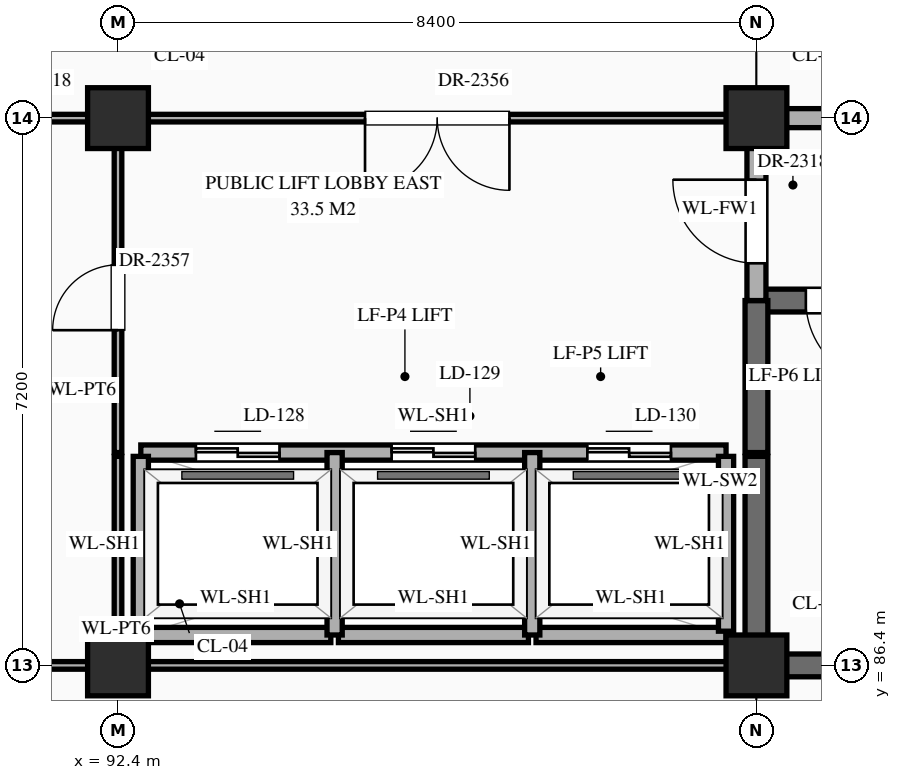
"""IFC4 building model, lengths in metres.
Left out: names, types, materials, properties, quantities, classifications, styles, units other than length and angle.
Written with IfcOpenShell. Run it as: python <this file> out.ifc"""

import sys

from ifc_helpers import new_model, si_unit, direction, frame, frame_2d, origin, origin_2d, place, context, subcontext, project, spatial, rectangle, extrude, element, fill, save


model = new_model("IFC4")
c1 = context("Model", 3, precision=1e-05, world=origin(), true_north=direction((0.0, 1.0)))
c2 = subcontext(c1, "Body", "Model", "MODEL_VIEW")
j1 = project(units=[si_unit("LENGTHUNIT", "METRE"), si_unit("PLANEANGLEUNIT", "RADIAN")], contexts=[c1])
p1 = place(None, origin())
s1 = spatial("IfcSite", under=j1, at=p1, CompositionType="ELEMENT")
p2 = place(p1, origin())
s2 = spatial("IfcBuilding", under=s1, at=p2, CompositionType="ELEMENT")
p3 = place(p2, frame((0.0, 0.0, 30.6)))
s3 = spatial("IfcBuildingStorey", under=s2, at=p3, CompositionType="ELEMENT", Elevation=30.6)
for number, where, z_axis, x_axis in (
    (1, (92.4, 86.4, 0.0), (0.0, 0.0, 1.0), (1.0, 0.0, 0.0)),
    (2, (92.4, 93.6, 0.0), (0.0, 0.0, 1.0), (1.0, 0.0, 0.0)),
    (3, (100.8, 86.4, 0.0), (0.0, 0.0, 1.0), (1.0, 0.0, 0.0)),
    (4, (100.8, 93.6, 0.0), (0.0, 0.0, 1.0), (1.0, 0.0, 0.0)),
):
    element("IfcColumn", number, at=place(p3, frame(where, z_axis=z_axis, x_axis=x_axis)), inside=s3, PredefinedType="COLUMN", context=c2, shape_type="SweptSolid", body=[
        extrude(rectangle(XDim=0.8, YDim=0.8, at=origin_2d()), origin(), (0.0, 0.0, 1.0), 4.5),
    ])
p4 = place(p3, frame((84.0, 86.4, 0.0), z_axis=(0.0, 0.0, 1.0), x_axis=(1.0, 0.0, 0.0)))
e5 = element("IfcWall", 5, at=p4, inside=s3, PredefinedType="STANDARD", context=c2, shape_type="SweptSolid", body=[
    extrude(rectangle(XDim=8.4, YDim=0.1, at=frame_2d((4.2, 0.0))), origin(), (0.0, 0.0, 1.0), 3.39),
])
p5 = place(p4, frame((1.09, 0.0, 0.0)))
e6 = element("IfcOpeningElement", 6, at=p5, cuts=e5, PredefinedType="OPENING", context=c2, shape_type="SweptSolid", body=[
    extrude(rectangle(XDim=0.94, YDim=2.3, at=frame_2d((0.47, 1.15))), frame((0.0, 0.062, 0.0), z_axis=(0.0, -1.0, 0.0), x_axis=(1.0, 0.0, 0.0)), (0.0, 0.0, 1.0), 0.124),
])
p6 = place(p4, frame((3.69, 0.0, 0.0)))
e7 = element("IfcOpeningElement", 7, at=p6, cuts=e5, PredefinedType="OPENING", context=c2, shape_type="SweptSolid", body=[
    extrude(rectangle(XDim=1.02, YDim=2.4, at=frame_2d((0.51, 1.2))), frame((0.0, 0.062, 0.0), z_axis=(0.0, -1.0, 0.0), x_axis=(1.0, 0.0, 0.0)), (0.0, 0.0, 1.0), 0.124),
])
p7 = place(p4, frame((6.31, 0.0, 0.0)))
e8 = element("IfcOpeningElement", 8, at=p7, cuts=e5, PredefinedType="OPENING", context=c2, shape_type="SweptSolid", body=[
    extrude(rectangle(XDim=1.06, YDim=2.4, at=frame_2d((0.53, 1.2))), frame((0.0, 0.062, 0.0), z_axis=(0.0, -1.0, 0.0), x_axis=(1.0, 0.0, 0.0)), (0.0, 0.0, 1.0), 0.124),
])
p8 = place(p3, frame((92.45, 86.4, 0.0), z_axis=(0.0, 0.0, 1.0), x_axis=(1.0, 0.0, 0.0)))
e9 = element("IfcWall", 9, at=p8, inside=s3, PredefinedType="STANDARD", context=c2, shape_type="SweptSolid", body=[
    extrude(rectangle(XDim=8.3, YDim=0.1, at=frame_2d((4.15, 0.0))), origin(), (0.0, 0.0, 1.0), 3.39),
])
p9 = place(p3, frame((100.8, 86.4, 0.0), z_axis=(0.0, 0.0, 1.0), x_axis=(1.0, 0.0, 0.0)))
e10 = element("IfcWall", 10, at=p9, inside=s3, PredefinedType="SHEAR", context=c2, shape_type="SweptSolid", body=[
    extrude(rectangle(XDim=8.4, YDim=0.3, at=frame_2d((4.2, 0.0))), origin(), (0.0, 0.0, 1.0), 4.24),
])
for number, where, z_axis, x_axis in (
    (11, (92.7, 86.8, 0.0), (0.0, 0.0, 1.0), (1.0, 0.0, 0.0)),
    (12, (95.3, 86.8, 0.0), (0.0, 0.0, 1.0), (1.0, 0.0, 0.0)),
    (13, (97.9, 86.8, 0.0), (0.0, 0.0, 1.0), (1.0, 0.0, 0.0)),
):
    element("IfcWall", number, at=place(p3, frame(where, z_axis=z_axis, x_axis=x_axis)), inside=s3, PredefinedType="STANDARD", context=c2, shape_type="SweptSolid", body=[
        extrude(rectangle(XDim=2.5, YDim=0.2, at=frame_2d((1.25, 0.0))), origin(), (0.0, 0.0, 1.0), 4.24),
    ])
p10 = place(p3, frame((92.7, 89.2, 0.0), z_axis=(0.0, 0.0, 1.0), x_axis=(1.0, 0.0, 0.0)))
e14 = element("IfcWall", 14, at=p10, inside=s3, PredefinedType="STANDARD", context=c2, shape_type="SweptSolid", body=[
    extrude(rectangle(XDim=7.7, YDim=0.2, at=frame_2d((3.85, 0.0))), origin(), (0.0, 0.0, 1.0), 4.24),
])
p11 = place(p10, frame((0.725, 0.0, 0.0)))
e15 = element("IfcOpeningElement", 15, at=p11, cuts=e14, PredefinedType="OPENING", context=c2, shape_type="SweptSolid", body=[
    extrude(rectangle(XDim=1.1, YDim=2.15, at=frame_2d((0.55, 1.075))), frame((0.0, 0.112, 0.0), z_axis=(0.0, -1.0, 0.0), x_axis=(1.0, 0.0, 0.0)), (0.0, 0.0, 1.0), 0.224),
])
p12 = place(p10, frame((3.3, 0.0, 0.0)))
e16 = element("IfcOpeningElement", 16, at=p12, cuts=e14, PredefinedType="OPENING", context=c2, shape_type="SweptSolid", body=[
    extrude(rectangle(XDim=1.1, YDim=2.15, at=frame_2d((0.55, 1.075))), frame((0.0, 0.112, 0.0), z_axis=(0.0, -1.0, 0.0), x_axis=(1.0, 0.0, 0.0)), (0.0, 0.0, 1.0), 0.224),
])
p13 = place(p10, frame((5.875, 0.0, 0.0)))
e17 = element("IfcOpeningElement", 17, at=p13, cuts=e14, PredefinedType="OPENING", context=c2, shape_type="SweptSolid", body=[
    extrude(rectangle(XDim=1.1, YDim=2.15, at=frame_2d((0.55, 1.075))), frame((0.0, 0.112, 0.0), z_axis=(0.0, -1.0, 0.0), x_axis=(1.0, 0.0, 0.0)), (0.0, 0.0, 1.0), 0.224),
])
p14 = place(p3, frame((100.8, 91.2, 0.0), z_axis=(0.0, 0.0, 1.0), x_axis=(1.0, 0.0, 0.0)))
e18 = element("IfcWall", 18, at=p14, inside=s3, PredefinedType="SHEAR", context=c2, shape_type="SweptSolid", body=[
    extrude(rectangle(XDim=8.4, YDim=0.3, at=frame_2d((4.2, 0.0))), origin(), (0.0, 0.0, 1.0), 4.24),
])
p15 = place(p14, frame((0.65, 0.0, 0.0)))
e19 = element("IfcOpeningElement", 19, at=p15, cuts=e18, PredefinedType="OPENING", context=c2, shape_type="SweptSolid", body=[
    extrude(rectangle(XDim=1.1, YDim=2.2, at=frame_2d((0.55, 1.1))), frame((0.0, 0.162, 0.0), z_axis=(0.0, -1.0, 0.0), x_axis=(1.0, 0.0, 0.0)), (0.0, 0.0, 1.0), 0.324),
])
p16 = place(p3, frame((67.2, 93.6, 0.0), z_axis=(0.0, 0.0, 1.0), x_axis=(1.0, 0.0, 0.0)))
e20 = element("IfcWall", 20, at=p16, inside=s3, PredefinedType="STANDARD", context=c2, shape_type="SweptSolid", body=[
    extrude(rectangle(XDim=33.6, YDim=0.1, at=frame_2d((16.8, 0.0))), origin(), (0.0, 0.0, 1.0), 3.39),
])
p17 = place(p16, frame((3.475, 0.0, 0.0)))
e21 = element("IfcOpeningElement", 21, at=p17, cuts=e20, PredefinedType="OPENING", context=c2, shape_type="SweptSolid", body=[
    extrude(rectangle(XDim=1.45, YDim=2.3, at=frame_2d((0.725, 1.15))), frame((0.0, 0.062, 0.0), z_axis=(0.0, -1.0, 0.0), x_axis=(1.0, 0.0, 0.0)), (0.0, 0.0, 1.0), 0.124),
])
p18 = place(p16, frame((28.45, 0.0, 0.0)))
e22 = element("IfcOpeningElement", 22, at=p18, cuts=e20, PredefinedType="OPENING", context=c2, shape_type="SweptSolid", body=[
    extrude(rectangle(XDim=1.9, YDim=2.5, at=frame_2d((0.95, 1.25))), frame((0.0, 0.062, 0.0), z_axis=(0.0, -1.0, 0.0), x_axis=(1.0, 0.0, 0.0)), (0.0, 0.0, 1.0), 0.124),
])
p19 = place(p16, frame((11.875, 0.0, 0.0)))
e23 = element("IfcOpeningElement", 23, at=p19, cuts=e20, PredefinedType="OPENING", context=c2, shape_type="SweptSolid", body=[
    extrude(rectangle(XDim=1.45, YDim=2.3, at=frame_2d((0.725, 1.15))), frame((0.0, 0.062, 0.0), z_axis=(0.0, -1.0, 0.0), x_axis=(1.0, 0.0, 0.0)), (0.0, 0.0, 1.0), 0.124),
])
p20 = place(p16, frame((17.76, 0.0, 0.0)))
e24 = element("IfcOpeningElement", 24, at=p20, cuts=e20, PredefinedType="OPENING", context=c2, shape_type="SweptSolid", body=[
    extrude(rectangle(XDim=1.2, YDim=2.35, at=frame_2d((0.6, 1.175))), frame((0.0, 0.062, 0.0), z_axis=(0.0, -1.0, 0.0), x_axis=(1.0, 0.0, 0.0)), (0.0, 0.0, 1.0), 0.124),
])
p21 = place(p16, frame((20.38, 0.0, 0.0)))
e25 = element("IfcOpeningElement", 25, at=p21, cuts=e20, PredefinedType="OPENING", context=c2, shape_type="SweptSolid", body=[
    extrude(rectangle(XDim=1.24, YDim=2.3, at=frame_2d((0.62, 1.15))), frame((0.0, 0.062, 0.0), z_axis=(0.0, -1.0, 0.0), x_axis=(1.0, 0.0, 0.0)), (0.0, 0.0, 1.0), 0.124),
])
p22 = place(p16, frame((23.0, 0.0, 0.0)))
e26 = element("IfcOpeningElement", 26, at=p22, cuts=e20, PredefinedType="OPENING", context=c2, shape_type="SweptSolid", body=[
    extrude(rectangle(XDim=1.28, YDim=2.35, at=frame_2d((0.64, 1.175))), frame((0.0, 0.062, 0.0), z_axis=(0.0, -1.0, 0.0), x_axis=(1.0, 0.0, 0.0)), (0.0, 0.0, 1.0), 0.124),
])
p23 = place(p3, frame((100.8, 93.6, 0.0), z_axis=(0.0, 0.0, 1.0), x_axis=(1.0, 0.0, 0.0)))
e27 = element("IfcWall", 27, at=p23, inside=s3, PredefinedType="STANDARD", context=c2, shape_type="SweptSolid", body=[
    extrude(rectangle(XDim=8.4, YDim=0.25, at=frame_2d((4.2, 0.0))), origin(), (0.0, 0.0, 1.0), 3.39),
])
p24 = place(p23, frame((3.45, 0.0, 0.0)))
e28 = element("IfcOpeningElement", 28, at=p24, cuts=e27, PredefinedType="OPENING", context=c2, shape_type="SweptSolid", body=[
    extrude(rectangle(XDim=1.5, YDim=2.25, at=frame_2d((0.75, 1.125))), frame((0.0, 0.137, 0.0), z_axis=(0.0, -1.0, 0.0), x_axis=(1.0, 0.0, 0.0)), (0.0, 0.0, 1.0), 0.274),
])
p25 = place(p3, frame((92.4, 86.45, 0.0), z_axis=(0.0, 0.0, 1.0), x_axis=(0.0, 1.0, 0.0)))
e29 = element("IfcWall", 29, at=p25, inside=s3, PredefinedType="STANDARD", context=c2, shape_type="SweptSolid", body=[
    extrude(rectangle(XDim=2.7, YDim=0.1, at=frame_2d((1.35, 0.0))), origin(), (0.0, 0.0, 1.0), 3.49),
])
p26 = place(p3, frame((92.4, 89.2, 0.0), z_axis=(0.0, 0.0, 1.0), x_axis=(0.0, 1.0, 0.0)))
e30 = element("IfcWall", 30, at=p26, inside=s3, PredefinedType="STANDARD", context=c2, shape_type="SweptSolid", body=[
    extrude(rectangle(XDim=4.4, YDim=0.1, at=frame_2d((2.2, 0.0))), origin(), (0.0, 0.0, 1.0), 3.49),
])
p27 = place(p26, frame((1.61, 0.0, 0.0)))
e31 = element("IfcOpeningElement", 31, at=p27, cuts=e30, PredefinedType="OPENING", context=c2, shape_type="SweptSolid", body=[
    extrude(rectangle(XDim=0.86, YDim=2.1, at=frame_2d((0.43, 1.05))), frame((0.0, 0.062, 0.0), z_axis=(0.0, -1.0, 0.0), x_axis=(1.0, 0.0, 0.0)), (0.0, 0.0, 1.0), 0.124),
])
p28 = place(p3, frame((92.7, 86.85, 0.0), z_axis=(0.0, 0.0, 1.0), x_axis=(0.0, 1.0, 0.0)))
e32 = element("IfcWall", 32, at=p28, inside=s3, PredefinedType="STANDARD", context=c2, shape_type="SweptSolid", body=[
    extrude(rectangle(XDim=2.3, YDim=0.2, at=frame_2d((1.15, 0.0))), origin(), (0.0, 0.0, 1.0), 4.24),
])
for number, where, z_axis, x_axis in (
    (33, (95.25, 86.8, 0.0), (0.0, 0.0, 1.0), (0.0, 1.0, 0.0)),
    (34, (97.85, 86.8, 0.0), (0.0, 0.0, 1.0), (0.0, 1.0, 0.0)),
):
    element("IfcWall", number, at=place(p3, frame(where, z_axis=z_axis, x_axis=x_axis)), inside=s3, PredefinedType="STANDARD", context=c2, shape_type="SweptSolid", body=[
        extrude(rectangle(XDim=2.4, YDim=0.2, at=frame_2d((1.2, 0.0))), origin(), (0.0, 0.0, 1.0), 4.24),
    ])
p29 = place(p3, frame((100.4, 86.85, 0.0), z_axis=(0.0, 0.0, 1.0), x_axis=(0.0, 1.0, 0.0)))
e35 = element("IfcWall", 35, at=p29, inside=s3, PredefinedType="STANDARD", context=c2, shape_type="SweptSolid", body=[
    extrude(rectangle(XDim=2.3, YDim=0.2, at=frame_2d((1.15, 0.0))), origin(), (0.0, 0.0, 1.0), 4.24),
])
p30 = place(p3, frame((100.8, 86.45, 0.0), z_axis=(0.0, 0.0, 1.0), x_axis=(0.0, 1.0, 0.0)))
e36 = element("IfcWall", 36, at=p30, inside=s3, PredefinedType="SHEAR", context=c2, shape_type="SweptSolid", body=[
    extrude(rectangle(XDim=2.7, YDim=0.3, at=frame_2d((1.35, 0.0))), origin(), (0.0, 0.0, 1.0), 4.24),
])
p31 = place(p3, frame((100.8, 89.2, 0.0), z_axis=(0.0, 0.0, 1.0), x_axis=(0.0, 1.0, 0.0)))
e37 = element("IfcWall", 37, at=p31, inside=s3, PredefinedType="SHEAR", context=c2, shape_type="SweptSolid", body=[
    extrude(rectangle(XDim=2.0, YDim=0.3, at=frame_2d((1.0, 0.0))), origin(), (0.0, 0.0, 1.0), 4.24),
])
p32 = place(p3, frame((100.8, 91.2, 0.0), z_axis=(0.0, 0.0, 1.0), x_axis=(0.0, 1.0, 0.0)))
e38 = element("IfcWall", 38, at=p32, inside=s3, PredefinedType="STANDARD", context=c2, shape_type="SweptSolid", body=[
    extrude(rectangle(XDim=2.4, YDim=0.25, at=frame_2d((1.2, 0.0))), origin(), (0.0, 0.0, 1.0), 3.49),
])
p33 = place(p32, frame((0.49, 0.0, 0.0)))
e39 = element("IfcOpeningElement", 39, at=p33, cuts=e38, PredefinedType="OPENING", context=c2, shape_type="SweptSolid", body=[
    extrude(rectangle(XDim=1.1, YDim=2.2, at=frame_2d((0.55, 1.1))), frame((0.0, 0.137, 0.0), z_axis=(0.0, -1.0, 0.0), x_axis=(1.0, 0.0, 0.0)), (0.0, 0.0, 1.0), 0.274),
])
p34 = place(p11, origin())
e40 = element("IfcDoor", 40, at=p34, inside=s3, OperationType="DOUBLE_DOOR_SLIDING", PredefinedType="DOOR", context=c2, shape_type="SweptSolid", body=[
    extrude(rectangle(XDim=1.1, YDim=2.15, at=frame_2d((0.55, 1.075))), frame((0.0, 0.025, 0.0), z_axis=(0.0, -1.0, 0.0), x_axis=(1.0, 0.0, 0.0)), (0.0, 0.0, 1.0), 0.05),
])
fill(e15, e40)
p35 = place(p12, origin())
e41 = element("IfcDoor", 41, at=p35, inside=s3, OperationType="DOUBLE_DOOR_SLIDING", PredefinedType="DOOR", context=c2, shape_type="SweptSolid", body=[
    extrude(rectangle(XDim=1.1, YDim=2.15, at=frame_2d((0.55, 1.075))), frame((0.0, 0.025, 0.0), z_axis=(0.0, -1.0, 0.0), x_axis=(1.0, 0.0, 0.0)), (0.0, 0.0, 1.0), 0.05),
])
fill(e16, e41)
p36 = place(p13, origin())
e42 = element("IfcDoor", 42, at=p36, inside=s3, OperationType="DOUBLE_DOOR_SLIDING", PredefinedType="DOOR", context=c2, shape_type="SweptSolid", body=[
    extrude(rectangle(XDim=1.1, YDim=2.15, at=frame_2d((0.55, 1.075))), frame((0.0, 0.025, 0.0), z_axis=(0.0, -1.0, 0.0), x_axis=(1.0, 0.0, 0.0)), (0.0, 0.0, 1.0), 0.05),
])
fill(e17, e42)
p37 = place(p15, frame((1.1, 0.0, 0.0), z_axis=(0.0, 0.0, 1.0), x_axis=(-1.0, 0.0, 0.0)))
e43 = element("IfcDoor", 43, at=p37, inside=s3, OperationType="SINGLE_SWING_LEFT", PredefinedType="DOOR", context=c2, shape_type="SweptSolid", body=[
    extrude(rectangle(XDim=1.1, YDim=2.2, at=frame_2d((0.55, 1.1))), frame((0.0, 0.025, 0.0), z_axis=(0.0, -1.0, 0.0), x_axis=(1.0, 0.0, 0.0)), (0.0, 0.0, 1.0), 0.05),
])
fill(e19, e43)
p38 = place(p33, origin())
e44 = element("IfcDoor", 44, at=p38, inside=s3, OperationType="SINGLE_SWING_RIGHT", PredefinedType="DOOR", context=c2, shape_type="SweptSolid", body=[
    extrude(rectangle(XDim=1.1, YDim=2.2, at=frame_2d((0.55, 1.1))), frame((0.0, 0.025, 0.0), z_axis=(0.0, -1.0, 0.0), x_axis=(1.0, 0.0, 0.0)), (0.0, 0.0, 1.0), 0.05),
])
fill(e39, e44)
p39 = place(p18, frame((1.9, 0.0, 0.0), z_axis=(0.0, 0.0, 1.0), x_axis=(-1.0, 0.0, 0.0)))
e45 = element("IfcDoor", 45, at=p39, inside=s3, OperationType="DOUBLE_DOOR_SINGLE_SWING", PredefinedType="DOOR", context=c2, shape_type="SweptSolid", body=[
    extrude(rectangle(XDim=1.9, YDim=2.5, at=frame_2d((0.95, 1.25))), frame((0.0, 0.025, 0.0), z_axis=(0.0, -1.0, 0.0), x_axis=(1.0, 0.0, 0.0)), (0.0, 0.0, 1.0), 0.05),
])
fill(e22, e45)
p40 = place(p27, origin())
e46 = element("IfcDoor", 46, at=p40, inside=s3, OperationType="SINGLE_SWING_LEFT", PredefinedType="DOOR", context=c2, shape_type="SweptSolid", body=[
    extrude(rectangle(XDim=0.86, YDim=2.1, at=frame_2d((0.43, 1.05))), frame((0.0, 0.025, 0.0), z_axis=(0.0, -1.0, 0.0), x_axis=(1.0, 0.0, 0.0)), (0.0, 0.0, 1.0), 0.05),
])
fill(e31, e46)
save(model, sys.argv[1])
